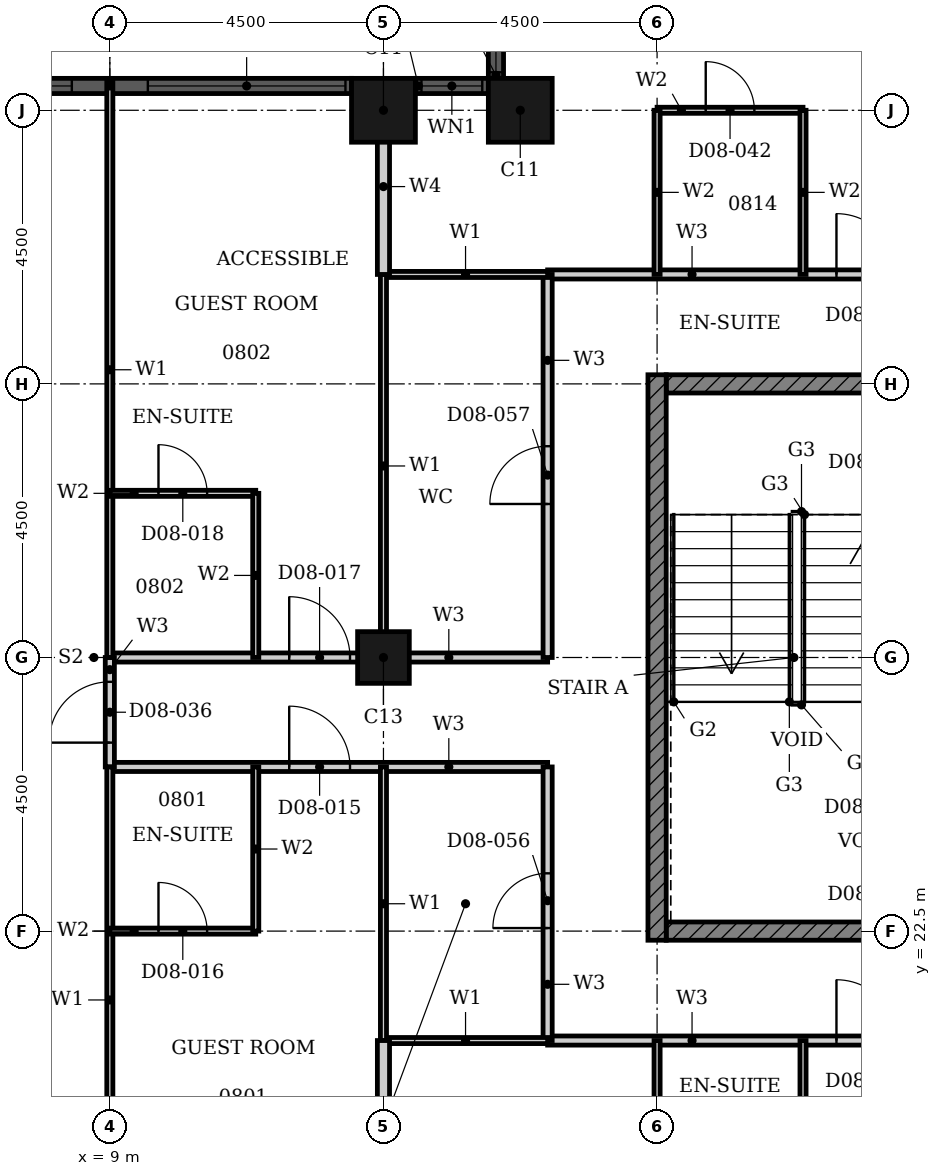
"""IFC4 building model, lengths in metres.
Left out: names, types, materials, properties, quantities, classifications, styles, units other than length and angle.
Written with IfcOpenShell. Run it as: python <this file> out.ifc"""

import sys

from ifc_helpers import new_model, si_unit, direction, frame, frame_2d, origin, origin_2d, place, context, subcontext, project, spatial, rectangle, hollow_rectangle, extrude, element, fill, save


model = new_model("IFC4")
c1 = context("Model", 3, precision=1e-05, world=origin(), true_north=direction((0.0, 1.0)))
c2 = subcontext(c1, "Body", "Model", "MODEL_VIEW")
j1 = project(units=[si_unit("LENGTHUNIT", "METRE"), si_unit("PLANEANGLEUNIT", "RADIAN")], contexts=[c1])
p1 = place(None, origin())
s1 = spatial("IfcSite", under=j1, at=p1, CompositionType="ELEMENT")
p2 = place(p1, origin())
s2 = spatial("IfcBuilding", under=s1, at=p2, CompositionType="ELEMENT")
p3 = place(p2, frame((0.0, 0.0, 40.8)))
s3 = spatial("IfcBuildingStorey", under=s2, at=p3, CompositionType="ELEMENT", Elevation=40.8)
for number, where, z_axis, x_axis in (
    (1, (15.75, 36.0, 0.0), (0.0, 0.0, 1.0), (1.0, 0.0, 0.0)),
    (2, (13.5, 36.0, 0.0), (0.0, 0.0, 1.0), (1.0, 0.0, 0.0)),
):
    element("IfcColumn", number, at=place(p3, frame(where, z_axis=z_axis, x_axis=x_axis)), inside=s3, PredefinedType="COLUMN", context=c2, shape_type="SweptSolid", body=[
        extrude(hollow_rectangle(XDim=1.05, YDim=1.05, WallThickness=0.034, at=origin_2d()), origin(), (0.0, 0.0, 1.0), 3.6),
    ])
p4 = place(p3, frame((13.5, 27.0, 0.0), z_axis=(0.0, 0.0, 1.0), x_axis=(1.0, 0.0, 0.0)))
e3 = element("IfcColumn", 3, at=p4, inside=s3, PredefinedType="COLUMN", context=c2, shape_type="SweptSolid", body=[
    extrude(hollow_rectangle(XDim=0.85, YDim=0.85, WallThickness=0.026, at=origin_2d()), origin(), (0.0, 0.0, 1.0), 3.6),
])
p5 = place(p3, frame((15.35, 37.725, 0.0), z_axis=(0.0, 0.0, 1.0), x_axis=(0.0, -1.0, 0.0)))
e4 = element("IfcWall", 4, at=p5, inside=s3, PredefinedType="SOLIDWALL", context=c2, shape_type="SweptSolid", body=[
    extrude(rectangle(XDim=1.2, YDim=0.25, at=frame_2d((0.6, 0.0))), origin(), (0.0, 0.0, 1.0), 3.6),
])
p6 = place(p5, frame((0.1, 0.0, 0.9)))
e5 = element("IfcOpeningElement", 5, at=p6, cuts=e4, PredefinedType="OPENING", context=c2, shape_type="SweptSolid", body=[
    extrude(rectangle(XDim=1.0, YDim=2.08, at=frame_2d((0.5, 1.04))), frame((0.0, 0.135, 0.0), z_axis=(0.0, -1.0, 0.0), x_axis=(1.0, 0.0, 0.0)), (0.0, 0.0, 1.0), 0.27),
])
p7 = place(p3, frame((15.225, 36.4, 0.0), z_axis=(0.0, 0.0, 1.0), x_axis=(-1.0, 0.0, 0.0)))
e6 = element("IfcWall", 6, at=p7, inside=s3, PredefinedType="SOLIDWALL", context=c2, shape_type="SweptSolid", body=[
    extrude(rectangle(XDim=1.2, YDim=0.25, at=frame_2d((0.6, 0.0))), origin(), (0.0, 0.0, 1.0), 3.6),
])
p8 = place(p7, frame((0.1, 0.0, 0.9)))
e7 = element("IfcOpeningElement", 7, at=p8, cuts=e6, PredefinedType="OPENING", context=c2, shape_type="SweptSolid", body=[
    extrude(rectangle(XDim=1.0, YDim=2.08, at=frame_2d((0.5, 1.04))), frame((0.0, 0.135, 0.0), z_axis=(0.0, -1.0, 0.0), x_axis=(1.0, 0.0, 0.0)), (0.0, 0.0, 1.0), 0.27),
])
p9 = place(p3, frame((12.975, 36.4, 0.0), z_axis=(0.0, 0.0, 1.0), x_axis=(-1.0, 0.0, 0.0)))
e8 = element("IfcWall", 8, at=p9, inside=s3, PredefinedType="SOLIDWALL", context=c2, shape_type="SweptSolid", body=[
    extrude(rectangle(XDim=7.95, YDim=0.25, at=frame_2d((3.975, 0.0))), origin(), (0.0, 0.0, 1.0), 3.6),
])
p10 = place(p9, frame((0.1, 0.0, 0.9)))
e9 = element("IfcOpeningElement", 9, at=p10, cuts=e8, PredefinedType="OPENING", context=c2, shape_type="SweptSolid", body=[
    extrude(rectangle(XDim=3.25, YDim=2.08, at=frame_2d((1.625, 1.04))), frame((0.0, 0.135, 0.0), z_axis=(0.0, -1.0, 0.0), x_axis=(1.0, 0.0, 0.0)), (0.0, 0.0, 1.0), 0.27),
])
p11 = place(p9, frame((4.6, 0.0, 0.9)))
e10 = element("IfcOpeningElement", 10, at=p11, cuts=e8, PredefinedType="OPENING", context=c2, shape_type="SweptSolid", body=[
    extrude(rectangle(XDim=3.25, YDim=2.08, at=frame_2d((1.625, 1.04))), frame((0.0, 0.135, 0.0), z_axis=(0.0, -1.0, 0.0), x_axis=(1.0, 0.0, 0.0)), (0.0, 0.0, 1.0), 0.27),
])
p12 = place(p3, frame((18.15, 22.5, 0.0), z_axis=(0.0, 0.0, 1.0), x_axis=(1.0, 0.0, 0.0)))
e11 = element("IfcWall", 11, at=p12, inside=s3, PredefinedType="SHEAR", context=c2, shape_type="SweptSolid", body=[
    extrude(rectangle(XDim=4.225, YDim=0.3, at=frame_2d((2.113, 0.0))), origin(), (0.0, 0.0, 1.0), 3.3),
])
p13 = place(p3, frame((18.15, 31.5, 0.0), z_axis=(0.0, 0.0, 1.0), x_axis=(1.0, 0.0, 0.0)))
e12 = element("IfcWall", 12, at=p13, inside=s3, PredefinedType="SHEAR", context=c2, shape_type="SweptSolid", body=[
    extrude(rectangle(XDim=6.797, YDim=0.3, at=frame_2d((3.398, 0.0))), origin(), (0.0, 0.0, 1.0), 3.3),
])
p14 = place(p13, frame((4.736, 0.0, 0.0)))
e13 = element("IfcOpeningElement", 13, at=p14, cuts=e12, PredefinedType="OPENING", context=c2, shape_type="SweptSolid", body=[
    extrude(rectangle(XDim=1.8, YDim=2.1, at=frame_2d((0.9, 1.05))), frame((0.0, 0.16, 0.0), z_axis=(0.0, -1.0, 0.0), x_axis=(1.0, 0.0, 0.0)), (0.0, 0.0, 1.0), 0.32),
])
p15 = place(p3, frame((18.0, 22.35, 0.0), z_axis=(0.0, 0.0, 1.0), x_axis=(0.0, 1.0, 0.0)))
e14 = element("IfcWall", 14, at=p15, inside=s3, PredefinedType="SHEAR", context=c2, shape_type="SweptSolid", body=[
    extrude(rectangle(XDim=9.3, YDim=0.3, at=frame_2d((4.65, 0.0))), origin(), (0.0, 0.0, 1.0), 3.3),
])
p16 = place(p3, frame((16.2, 20.7, 0.0), z_axis=(0.0, 0.0, 1.0), x_axis=(1.0, 0.0, 0.0)))
e15 = element("IfcWall", 15, at=p16, inside=s3, PredefinedType="PARTITIONING", context=c2, shape_type="SweptSolid", body=[
    extrude(rectangle(XDim=9.3, YDim=0.15, at=frame_2d((4.65, 0.0))), origin(), (0.0, 0.0, 1.0), 3.3),
])
p17 = place(p16, frame((4.75, 0.0, 0.0)))
e16 = element("IfcOpeningElement", 16, at=p17, cuts=e15, PredefinedType="OPENING", context=c2, shape_type="SweptSolid", body=[
    extrude(rectangle(XDim=1.0, YDim=2.1, at=frame_2d((0.5, 1.05))), frame((0.0, 0.085, 0.0), z_axis=(0.0, -1.0, 0.0), x_axis=(1.0, 0.0, 0.0)), (0.0, 0.0, 1.0), 0.17),
])
p18 = place(p16, frame((7.35, 0.0, 0.0)))
e17 = element("IfcOpeningElement", 17, at=p18, cuts=e15, PredefinedType="OPENING", context=c2, shape_type="SweptSolid", body=[
    extrude(rectangle(XDim=0.9, YDim=2.1, at=frame_2d((0.45, 1.05))), frame((0.0, 0.085, 0.0), z_axis=(0.0, -1.0, 0.0), x_axis=(1.0, 0.0, 0.0)), (0.0, 0.0, 1.0), 0.17),
])
p19 = place(p3, frame((9.0, 25.2, 0.0), z_axis=(0.0, 0.0, 1.0), x_axis=(1.0, 0.0, 0.0)))
e18 = element("IfcWall", 18, at=p19, inside=s3, PredefinedType="PARTITIONING", context=c2, shape_type="SweptSolid", body=[
    extrude(rectangle(XDim=7.2, YDim=0.15, at=frame_2d((3.6, 0.0))), origin(), (0.0, 0.0, 1.0), 3.3),
])
p20 = place(p19, frame((2.95, 0.0, 0.0)))
e19 = element("IfcOpeningElement", 19, at=p20, cuts=e18, PredefinedType="OPENING", context=c2, shape_type="SweptSolid", body=[
    extrude(rectangle(XDim=1.0, YDim=2.1, at=frame_2d((0.5, 1.05))), frame((0.0, 0.085, 0.0), z_axis=(0.0, -1.0, 0.0), x_axis=(1.0, 0.0, 0.0)), (0.0, 0.0, 1.0), 0.17),
])
p21 = place(p3, frame((9.0, 27.0, 0.0), z_axis=(0.0, 0.0, 1.0), x_axis=(1.0, 0.0, 0.0)))
e20 = element("IfcWall", 20, at=p21, inside=s3, PredefinedType="PARTITIONING", context=c2, shape_type="SweptSolid", body=[
    extrude(rectangle(XDim=7.2, YDim=0.15, at=frame_2d((3.6, 0.0))), origin(), (0.0, 0.0, 1.0), 2.58),
])
p22 = place(p21, frame((2.95, 0.0, 0.0)))
e21 = element("IfcOpeningElement", 21, at=p22, cuts=e20, PredefinedType="OPENING", context=c2, shape_type="SweptSolid", body=[
    extrude(rectangle(XDim=1.0, YDim=2.1, at=frame_2d((0.5, 1.05))), frame((0.0, 0.085, 0.0), z_axis=(0.0, -1.0, 0.0), x_axis=(1.0, 0.0, 0.0)), (0.0, 0.0, 1.0), 0.17),
])
p23 = place(p3, frame((16.2, 33.3, 0.0), z_axis=(0.0, 0.0, 1.0), x_axis=(1.0, 0.0, 0.0)))
e22 = element("IfcWall", 22, at=p23, inside=s3, PredefinedType="PARTITIONING", context=c2, shape_type="SweptSolid", body=[
    extrude(rectangle(XDim=15.3, YDim=0.15, at=frame_2d((7.65, 0.0))), origin(), (0.0, 0.0, 1.0), 3.3),
])
p24 = place(p23, frame((4.75, 0.0, 0.0)))
e23 = element("IfcOpeningElement", 23, at=p24, cuts=e22, PredefinedType="OPENING", context=c2, shape_type="SweptSolid", body=[
    extrude(rectangle(XDim=1.0, YDim=2.1, at=frame_2d((0.5, 1.05))), frame((0.0, 0.085, 0.0), z_axis=(0.0, -1.0, 0.0), x_axis=(1.0, 0.0, 0.0)), (0.0, 0.0, 1.0), 0.17),
])
p25 = place(p23, frame((10.35, 0.0, 0.0)))
e24 = element("IfcOpeningElement", 24, at=p25, cuts=e22, PredefinedType="OPENING", context=c2, shape_type="SweptSolid", body=[
    extrude(rectangle(XDim=0.9, YDim=2.1, at=frame_2d((0.45, 1.05))), frame((0.0, 0.085, 0.0), z_axis=(0.0, -1.0, 0.0), x_axis=(1.0, 0.0, 0.0)), (0.0, 0.0, 1.0), 0.17),
])
p26 = place(p3, frame((16.2, 27.0, 0.0), z_axis=(0.0, 0.0, 1.0), x_axis=(0.0, 1.0, 0.0)))
e25 = element("IfcWall", 25, at=p26, inside=s3, PredefinedType="PARTITIONING", context=c2, shape_type="SweptSolid", body=[
    extrude(rectangle(XDim=6.3, YDim=0.15, at=frame_2d((3.15, 0.0))), origin(), (0.0, 0.0, 1.0), 3.3),
])
p27 = place(p26, frame((2.525, 0.0, 0.0)))
e26 = element("IfcOpeningElement", 26, at=p27, cuts=e25, PredefinedType="OPENING", context=c2, shape_type="SweptSolid", body=[
    extrude(rectangle(XDim=0.95, YDim=2.1, at=frame_2d((0.475, 1.05))), frame((0.0, 0.085, 0.0), z_axis=(0.0, -1.0, 0.0), x_axis=(1.0, 0.0, 0.0)), (0.0, 0.0, 1.0), 0.17),
])
p28 = place(p3, frame((16.2, 20.7, 0.0), z_axis=(0.0, 0.0, 1.0), x_axis=(0.0, 1.0, 0.0)))
e27 = element("IfcWall", 27, at=p28, inside=s3, PredefinedType="PARTITIONING", context=c2, shape_type="SweptSolid", body=[
    extrude(rectangle(XDim=4.5, YDim=0.15, at=frame_2d((2.25, 0.0))), origin(), (0.0, 0.0, 1.0), 3.3),
])
p29 = place(p28, frame((1.85, 0.0, 0.0)))
e28 = element("IfcOpeningElement", 28, at=p29, cuts=e27, PredefinedType="OPENING", context=c2, shape_type="SweptSolid", body=[
    extrude(rectangle(XDim=0.9, YDim=2.1, at=frame_2d((0.45, 1.05))), frame((0.0, 0.085, 0.0), z_axis=(0.0, -1.0, 0.0), x_axis=(1.0, 0.0, 0.0)), (0.0, 0.0, 1.0), 0.17),
])
p30 = place(p3, frame((9.0, 25.2, 0.0), z_axis=(0.0, 0.0, 1.0), x_axis=(0.0, 1.0, 0.0)))
e29 = element("IfcWall", 29, at=p30, inside=s3, PredefinedType="PARTITIONING", context=c2, shape_type="SweptSolid", body=[
    extrude(rectangle(XDim=1.8, YDim=0.15, at=frame_2d((0.9, 0.0))), origin(), (0.0, 0.0, 1.0), 3.3),
])
p31 = place(p30, frame((0.4, 0.0, 0.0)))
e30 = element("IfcOpeningElement", 30, at=p31, cuts=e29, PredefinedType="OPENING", context=c2, shape_type="SweptSolid", body=[
    extrude(rectangle(XDim=1.0, YDim=2.1, at=frame_2d((0.5, 1.05))), frame((0.0, 0.085, 0.0), z_axis=(0.0, -1.0, 0.0), x_axis=(1.0, 0.0, 0.0)), (0.0, 0.0, 1.0), 0.17),
])
for number, where, z_axis, x_axis in (
    (31, (13.5, 20.7, 0.0), (0.0, 0.0, 1.0), (1.0, 0.0, 0.0)),
    (32, (13.5, 33.3, 0.0), (0.0, 0.0, 1.0), (1.0, 0.0, 0.0)),
):
    element("IfcWall", number, at=place(p3, frame(where, z_axis=z_axis, x_axis=x_axis)), inside=s3, PredefinedType="PARTITIONING", context=c2, shape_type="SweptSolid", body=[
        extrude(rectangle(XDim=2.7, YDim=0.1, at=frame_2d((1.35, 0.0))), origin(), (0.0, 0.0, 1.0), 3.3),
    ])
p32 = place(p3, frame((13.5, 27.0, 0.0), z_axis=(0.0, 0.0, 1.0), x_axis=(0.0, 1.0, 0.0)))
e33 = element("IfcWall", 33, at=p32, inside=s3, PredefinedType="PARTITIONING", context=c2, shape_type="SweptSolid", body=[
    extrude(rectangle(XDim=6.3, YDim=0.1, at=frame_2d((3.15, 0.0))), origin(), (0.0, 0.0, 1.0), 2.38),
])
p33 = place(p3, frame((13.5, 20.7, 0.0), z_axis=(0.0, 0.0, 1.0), x_axis=(0.0, 1.0, 0.0)))
e34 = element("IfcWall", 34, at=p33, inside=s3, PredefinedType="PARTITIONING", context=c2, shape_type="SweptSolid", body=[
    extrude(rectangle(XDim=4.5, YDim=0.1, at=frame_2d((2.25, 0.0))), origin(), (0.0, 0.0, 1.0), 2.38),
])
p34 = place(p3, frame((9.0, 27.0, 0.0), z_axis=(0.0, 0.0, 1.0), x_axis=(0.0, 1.0, 0.0)))
e35 = element("IfcWall", 35, at=p34, inside=s3, PredefinedType="PARTITIONING", context=c2, shape_type="SweptSolid", body=[
    extrude(rectangle(XDim=9.465, YDim=0.1, at=frame_2d((4.732, 0.0))), origin(), (0.0, 0.0, 1.0), 3.3),
])
p35 = place(p3, frame((9.0, 17.535, 0.0), z_axis=(0.0, 0.0, 1.0), x_axis=(0.0, 1.0, 0.0)))
e36 = element("IfcWall", 36, at=p35, inside=s3, PredefinedType="PARTITIONING", context=c2, shape_type="SweptSolid", body=[
    extrude(rectangle(XDim=7.665, YDim=0.1, at=frame_2d((3.833, 0.0))), origin(), (0.0, 0.0, 1.0), 3.3),
])
for number, where, z_axis, x_axis in (
    (37, (13.5, 33.3, 0.0), (0.0, 0.0, 1.0), (0.0, 1.0, 0.0)),
    (38, (13.5, 17.81, 0.0), (0.0, 0.0, 1.0), (0.0, 1.0, 0.0)),
):
    element("IfcWall", number, at=place(p3, frame(where, z_axis=z_axis, x_axis=x_axis)), inside=s3, PredefinedType="PARTITIONING", context=c2, shape_type="SweptSolid", body=[
        extrude(rectangle(XDim=2.89, YDim=0.2, at=frame_2d((1.445, 0.0))), origin(), (0.0, 0.0, 1.0), 2.38),
    ])
p36 = place(p3, frame((9.0, 22.5, 0.0), z_axis=(0.0, 0.0, 1.0), x_axis=(1.0, 0.0, 0.0)))
e39 = element("IfcWall", 39, at=p36, inside=s3, PredefinedType="PARTITIONING", context=c2, shape_type="SweptSolid", body=[
    extrude(rectangle(XDim=2.4, YDim=0.1, at=frame_2d((1.2, 0.0))), origin(), (0.0, 0.0, 1.0), 2.58),
])
p37 = place(p36, frame((0.8, 0.0, 0.0)))
e40 = element("IfcOpeningElement", 40, at=p37, cuts=e39, PredefinedType="OPENING", context=c2, shape_type="SweptSolid", body=[
    extrude(rectangle(XDim=0.8, YDim=2.1, at=frame_2d((0.4, 1.05))), frame((0.0, 0.06, 0.0), z_axis=(0.0, -1.0, 0.0), x_axis=(1.0, 0.0, 0.0)), (0.0, 0.0, 1.0), 0.12),
])
p38 = place(p3, frame((9.0, 29.7, 0.0), z_axis=(0.0, 0.0, 1.0), x_axis=(1.0, 0.0, 0.0)))
e41 = element("IfcWall", 41, at=p38, inside=s3, PredefinedType="PARTITIONING", context=c2, shape_type="SweptSolid", body=[
    extrude(rectangle(XDim=2.4, YDim=0.1, at=frame_2d((1.2, 0.0))), origin(), (0.0, 0.0, 1.0), 3.3),
])
p39 = place(p38, frame((0.8, 0.0, 0.0)))
e42 = element("IfcOpeningElement", 42, at=p39, cuts=e41, PredefinedType="OPENING", context=c2, shape_type="SweptSolid", body=[
    extrude(rectangle(XDim=0.8, YDim=2.1, at=frame_2d((0.4, 1.05))), frame((0.0, 0.06, 0.0), z_axis=(0.0, -1.0, 0.0), x_axis=(1.0, 0.0, 0.0)), (0.0, 0.0, 1.0), 0.12),
])
p40 = place(p3, frame((18.0, 36.0, 0.0), z_axis=(0.0, 0.0, 1.0), x_axis=(1.0, 0.0, 0.0)))
e43 = element("IfcWall", 43, at=p40, inside=s3, PredefinedType="PARTITIONING", context=c2, shape_type="SweptSolid", body=[
    extrude(rectangle(XDim=2.4, YDim=0.1, at=frame_2d((1.2, 0.0))), origin(), (0.0, 0.0, 1.0), 3.3),
])
p41 = place(p40, frame((0.8, 0.0, 0.0)))
e44 = element("IfcOpeningElement", 44, at=p41, cuts=e43, PredefinedType="OPENING", context=c2, shape_type="SweptSolid", body=[
    extrude(rectangle(XDim=0.8, YDim=2.1, at=frame_2d((0.4, 1.05))), frame((0.0, 0.06, 0.0), z_axis=(0.0, -1.0, 0.0), x_axis=(1.0, 0.0, 0.0)), (0.0, 0.0, 1.0), 0.12),
])
for number, where, z_axis, x_axis in (
    (45, (11.4, 27.0, 0.0), (0.0, 0.0, 1.0), (0.0, 1.0, 0.0)),
    (46, (11.4, 22.5, 0.0), (0.0, 0.0, 1.0), (0.0, 1.0, 0.0)),
    (47, (18.0, 33.3, 0.0), (0.0, 0.0, 1.0), (0.0, 1.0, 0.0)),
    (48, (18.0, 18.0, 0.0), (0.0, 0.0, 1.0), (0.0, 1.0, 0.0)),
    (49, (20.4, 33.3, 0.0), (0.0, 0.0, 1.0), (0.0, 1.0, 0.0)),
    (50, (20.4, 18.0, 0.0), (0.0, 0.0, 1.0), (0.0, 1.0, 0.0)),
):
    element("IfcWall", number, at=place(p3, frame(where, z_axis=z_axis, x_axis=x_axis)), inside=s3, PredefinedType="PARTITIONING", context=c2, shape_type="SweptSolid", body=[
        extrude(rectangle(XDim=2.7, YDim=0.1, at=frame_2d((1.35, 0.0))), origin(), (0.0, 0.0, 1.0), 3.3),
    ])
p42 = place(p6, origin())
e51 = element("IfcWindow", 51, at=p42, inside=s3, PartitioningType="SINGLE_PANEL", PredefinedType="WINDOW", context=c2, shape_type="SweptSolid", body=[
    extrude(rectangle(XDim=1.0, YDim=2.08, at=frame_2d((0.5, 1.04))), frame((0.0, 0.03, 0.0), z_axis=(0.0, -1.0, 0.0), x_axis=(1.0, 0.0, 0.0)), (0.0, 0.0, 1.0), 0.06),
])
fill(e5, e51)
p43 = place(p8, origin())
e52 = element("IfcWindow", 52, at=p43, inside=s3, PartitioningType="SINGLE_PANEL", PredefinedType="WINDOW", context=c2, shape_type="SweptSolid", body=[
    extrude(rectangle(XDim=1.0, YDim=2.08, at=frame_2d((0.5, 1.04))), frame((0.0, 0.03, 0.0), z_axis=(0.0, -1.0, 0.0), x_axis=(1.0, 0.0, 0.0)), (0.0, 0.0, 1.0), 0.06),
])
fill(e7, e52)
p44 = place(p10, origin())
e53 = element("IfcWindow", 53, at=p44, inside=s3, PartitioningType="SINGLE_PANEL", PredefinedType="WINDOW", context=c2, shape_type="SweptSolid", body=[
    extrude(rectangle(XDim=3.25, YDim=2.08, at=frame_2d((1.625, 1.04))), frame((0.0, 0.03, 0.0), z_axis=(0.0, -1.0, 0.0), x_axis=(1.0, 0.0, 0.0)), (0.0, 0.0, 1.0), 0.06),
])
fill(e9, e53)
p45 = place(p11, origin())
e54 = element("IfcWindow", 54, at=p45, inside=s3, PartitioningType="SINGLE_PANEL", PredefinedType="WINDOW", context=c2, shape_type="SweptSolid", body=[
    extrude(rectangle(XDim=3.25, YDim=2.08, at=frame_2d((1.625, 1.04))), frame((0.0, 0.03, 0.0), z_axis=(0.0, -1.0, 0.0), x_axis=(1.0, 0.0, 0.0)), (0.0, 0.0, 1.0), 0.06),
])
fill(e10, e54)
p46 = place(p20, origin())
e55 = element("IfcDoor", 55, at=p46, inside=s3, OperationType="SINGLE_SWING_RIGHT", PredefinedType="DOOR", context=c2, shape_type="SweptSolid", body=[
    extrude(rectangle(XDim=1.0, YDim=2.1, at=frame_2d((0.5, 1.05))), frame((0.0, 0.025, 0.0), z_axis=(0.0, -1.0, 0.0), x_axis=(1.0, 0.0, 0.0)), (0.0, 0.0, 1.0), 0.05),
])
fill(e19, e55)
p47 = place(p37, origin())
e56 = element("IfcDoor", 56, at=p47, inside=s3, OperationType="SINGLE_SWING_RIGHT", PredefinedType="DOOR", context=c2, shape_type="SweptSolid", body=[
    extrude(rectangle(XDim=0.8, YDim=2.1, at=frame_2d((0.4, 1.05))), frame((0.0, 0.025, 0.0), z_axis=(0.0, -1.0, 0.0), x_axis=(1.0, 0.0, 0.0)), (0.0, 0.0, 1.0), 0.05),
])
fill(e40, e56)
p48 = place(p22, origin())
e57 = element("IfcDoor", 57, at=p48, inside=s3, OperationType="SINGLE_SWING_RIGHT", PredefinedType="DOOR", context=c2, shape_type="SweptSolid", body=[
    extrude(rectangle(XDim=1.0, YDim=2.1, at=frame_2d((0.5, 1.05))), frame((0.0, 0.025, 0.0), z_axis=(0.0, -1.0, 0.0), x_axis=(1.0, 0.0, 0.0)), (0.0, 0.0, 1.0), 0.05),
])
fill(e21, e57)
p49 = place(p39, origin())
e58 = element("IfcDoor", 58, at=p49, inside=s3, OperationType="SINGLE_SWING_RIGHT", PredefinedType="DOOR", context=c2, shape_type="SweptSolid", body=[
    extrude(rectangle(XDim=0.8, YDim=2.1, at=frame_2d((0.4, 1.05))), frame((0.0, 0.025, 0.0), z_axis=(0.0, -1.0, 0.0), x_axis=(1.0, 0.0, 0.0)), (0.0, 0.0, 1.0), 0.05),
])
fill(e42, e58)
p50 = place(p31, origin())
e59 = element("IfcDoor", 59, at=p50, inside=s3, OperationType="SINGLE_SWING_RIGHT", PredefinedType="DOOR", context=c2, shape_type="SweptSolid", body=[
    extrude(rectangle(XDim=1.0, YDim=2.1, at=frame_2d((0.5, 1.05))), frame((0.0, 0.025, 0.0), z_axis=(0.0, -1.0, 0.0), x_axis=(1.0, 0.0, 0.0)), (0.0, 0.0, 1.0), 0.05),
])
fill(e30, e59)
p51 = place(p24, origin())
e60 = element("IfcDoor", 60, at=p51, inside=s3, OperationType="SINGLE_SWING_RIGHT", PredefinedType="DOOR", context=c2, shape_type="SweptSolid", body=[
    extrude(rectangle(XDim=1.0, YDim=2.1, at=frame_2d((0.5, 1.05))), frame((0.0, 0.025, 0.0), z_axis=(0.0, -1.0, 0.0), x_axis=(1.0, 0.0, 0.0)), (0.0, 0.0, 1.0), 0.05),
])
fill(e23, e60)
p52 = place(p41, origin())
e61 = element("IfcDoor", 61, at=p52, inside=s3, OperationType="SINGLE_SWING_RIGHT", PredefinedType="DOOR", context=c2, shape_type="SweptSolid", body=[
    extrude(rectangle(XDim=0.8, YDim=2.1, at=frame_2d((0.4, 1.05))), frame((0.0, 0.025, 0.0), z_axis=(0.0, -1.0, 0.0), x_axis=(1.0, 0.0, 0.0)), (0.0, 0.0, 1.0), 0.05),
])
fill(e44, e61)
p53 = place(p17, origin())
e62 = element("IfcDoor", 62, at=p53, inside=s3, OperationType="SINGLE_SWING_RIGHT", PredefinedType="DOOR", context=c2, shape_type="SweptSolid", body=[
    extrude(rectangle(XDim=1.0, YDim=2.1, at=frame_2d((0.5, 1.05))), frame((0.0, 0.025, 0.0), z_axis=(0.0, -1.0, 0.0), x_axis=(1.0, 0.0, 0.0)), (0.0, 0.0, 1.0), 0.05),
])
fill(e16, e62)
p54 = place(p29, origin())
e63 = element("IfcDoor", 63, at=p54, inside=s3, OperationType="SINGLE_SWING_LEFT", PredefinedType="DOOR", context=c2, shape_type="SweptSolid", body=[
    extrude(rectangle(XDim=0.9, YDim=2.1, at=frame_2d((0.45, 1.05))), frame((0.0, 0.025, 0.0), z_axis=(0.0, -1.0, 0.0), x_axis=(1.0, 0.0, 0.0)), (0.0, 0.0, 1.0), 0.05),
])
fill(e28, e63)
p55 = place(p27, origin())
e64 = element("IfcDoor", 64, at=p55, inside=s3, OperationType="SINGLE_SWING_LEFT", PredefinedType="DOOR", context=c2, shape_type="SweptSolid", body=[
    extrude(rectangle(XDim=0.95, YDim=2.1, at=frame_2d((0.475, 1.05))), frame((0.0, 0.025, 0.0), z_axis=(0.0, -1.0, 0.0), x_axis=(1.0, 0.0, 0.0)), (0.0, 0.0, 1.0), 0.05),
])
fill(e26, e64)
save(model, sys.argv[1])
